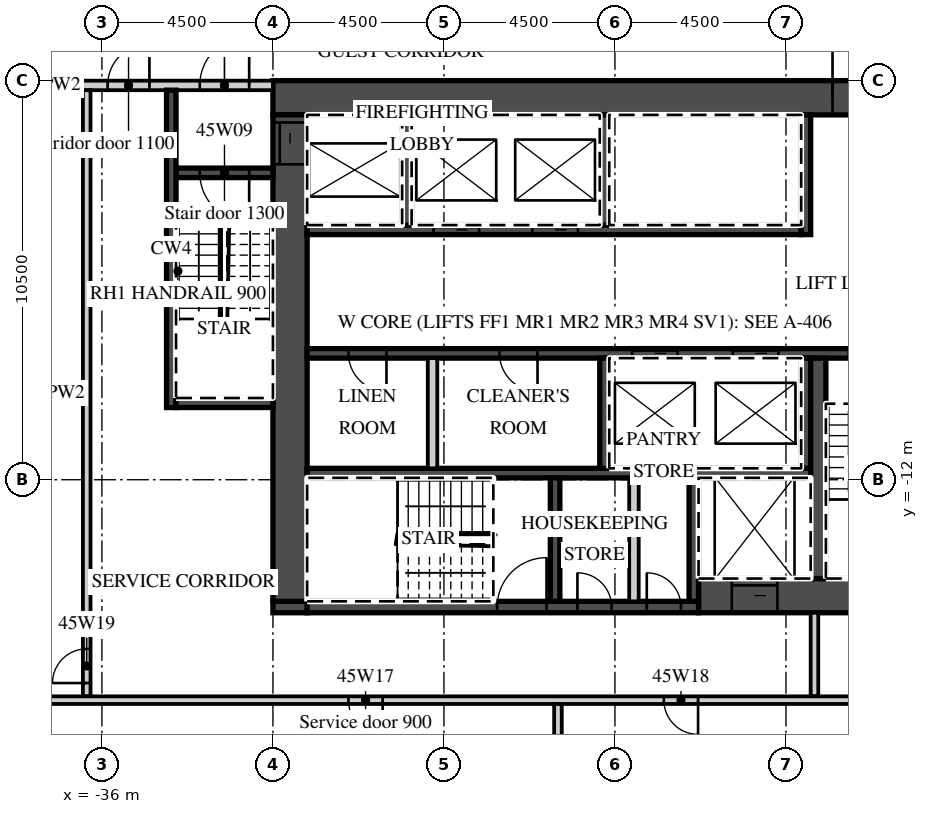
"""IFC4 building model, lengths in metres.
Left out: names, types, materials, properties, quantities, classifications, styles, units other than length and angle.
Written with IfcOpenShell. Run it as: python <this file> out.ifc"""

import sys

from ifc_helpers import new_model, si_unit, direction, frame, frame_2d, origin, place, context, subcontext, project, spatial, rectangle, extrude, element, fill, save


model = new_model("IFC4")
c1 = context("Model", 3, precision=1e-05, world=origin(), true_north=direction((0.0, 1.0)))
c2 = subcontext(c1, "Body", "Model", "MODEL_VIEW")
j1 = project(units=[si_unit("LENGTHUNIT", "METRE"), si_unit("PLANEANGLEUNIT", "RADIAN")], contexts=[c1])
p1 = place(None, origin())
s1 = spatial("IfcSite", under=j1, at=p1, CompositionType="ELEMENT")
p2 = place(p1, origin())
s2 = spatial("IfcBuilding", under=s1, at=p2, CompositionType="ELEMENT")
p3 = place(p2, frame((0.0, 0.0, 190.0)))
s3 = spatial("IfcBuildingStorey", under=s2, at=p3, CompositionType="ELEMENT", Elevation=190.0)
p4 = place(p3, frame((-31.5, -1.95, 0.0), z_axis=(0.0, 0.0, 1.0), x_axis=(1.0, 0.0, 0.0)))
e1 = element("IfcWall", 1, at=p4, inside=s3, PredefinedType="SHEAR", context=c2, shape_type="SweptSolid", body=[
    extrude(rectangle(XDim=18.0, YDim=0.9, at=frame_2d((9.0, 0.0))), origin(), (0.0, 0.0, 1.0), 3.02),
])
p5 = place(p4, frame((14.725, 0.0, 0.0)))
e2 = element("IfcOpeningElement", 2, at=p5, cuts=e1, PredefinedType="OPENING", context=c2, shape_type="SweptSolid", body=[
    extrude(rectangle(XDim=1.8, YDim=2.1, at=frame_2d((0.9, 1.05))), frame((0.0, 0.46, 0.0), z_axis=(0.0, -1.0, 0.0), x_axis=(1.0, 0.0, 0.0)), (0.0, 0.0, 1.0), 0.92),
])
p6 = place(p3, frame((-20.3, -15.05, 0.0), z_axis=(0.0, 0.0, 1.0), x_axis=(1.0, 0.0, 0.0)))
e3 = element("IfcWall", 3, at=p6, inside=s3, PredefinedType="SHEAR", context=c2, shape_type="SweptSolid", body=[
    extrude(rectangle(XDim=6.8, YDim=0.9, at=frame_2d((3.4, 0.0))), origin(), (0.0, 0.0, 1.0), 3.02),
])
p7 = place(p6, frame((0.875, 0.0, 0.0)))
e4 = element("IfcOpeningElement", 4, at=p7, cuts=e3, PredefinedType="OPENING", context=c2, shape_type="SweptSolid", body=[
    extrude(rectangle(XDim=1.2, YDim=2.1, at=frame_2d((0.6, 1.05))), frame((0.0, 0.46, 0.0), z_axis=(0.0, -1.0, 0.0), x_axis=(1.0, 0.0, 0.0)), (0.0, 0.0, 1.0), 0.92),
])
p8 = place(p3, frame((-31.5, -15.35, 0.0), z_axis=(0.0, 0.0, 1.0), x_axis=(1.0, 0.0, 0.0)))
e5 = element("IfcWall", 5, at=p8, inside=s3, PredefinedType="SHEAR", context=c2, shape_type="SweptSolid", body=[
    extrude(rectangle(XDim=0.9, YDim=0.3, at=frame_2d((0.45, 0.0))), origin(), (0.0, 0.0, 1.0), 3.02),
])
p9 = place(p3, frame((-30.6, -15.35, 0.0), z_axis=(0.0, 0.0, 1.0), x_axis=(1.0, 0.0, 0.0)))
e6 = element("IfcWall", 6, at=p9, inside=s3, PredefinedType="SHEAR", context=c2, shape_type="SweptSolid", body=[
    extrude(rectangle(XDim=10.3, YDim=0.3, at=frame_2d((5.15, 0.0))), origin(), (0.0, 0.0, 1.0), 3.02),
])
p10 = place(p9, frame((5.0, 0.0, 0.0)))
e7 = element("IfcOpeningElement", 7, at=p10, cuts=e6, PredefinedType="OPENING", context=c2, shape_type="SweptSolid", body=[
    extrude(rectangle(XDim=1.3, YDim=2.1, at=frame_2d((0.65, 1.05))), frame((0.0, 0.16, 0.0), z_axis=(0.0, -1.0, 0.0), x_axis=(1.0, 0.0, 0.0)), (0.0, 0.0, 1.0), 0.32),
])
p11 = place(p9, frame((7.113, 0.0, 0.0)))
e8 = element("IfcOpeningElement", 8, at=p11, cuts=e6, PredefinedType="OPENING", context=c2, shape_type="SweptSolid", body=[
    extrude(rectangle(XDim=0.9, YDim=2.1, at=frame_2d((0.45, 1.05))), frame((0.0, 0.16, 0.0), z_axis=(0.0, -1.0, 0.0), x_axis=(1.0, 0.0, 0.0)), (0.0, 0.0, 1.0), 0.32),
])
p12 = place(p9, frame((8.938, 0.0, 0.0)))
e9 = element("IfcOpeningElement", 9, at=p12, cuts=e6, PredefinedType="OPENING", context=c2, shape_type="SweptSolid", body=[
    extrude(rectangle(XDim=0.9, YDim=2.1, at=frame_2d((0.45, 1.05))), frame((0.0, 0.16, 0.0), z_axis=(0.0, -1.0, 0.0), x_axis=(1.0, 0.0, 0.0)), (0.0, 0.0, 1.0), 0.32),
])
p13 = place(p3, frame((-31.05, -15.2, 0.0), z_axis=(0.0, 0.0, 1.0), x_axis=(0.0, 1.0, 0.0)))
e10 = element("IfcWall", 10, at=p13, inside=s3, PredefinedType="SHEAR", context=c2, shape_type="SweptSolid", body=[
    extrude(rectangle(XDim=12.8, YDim=0.9, at=frame_2d((6.4, 0.0))), origin(), (0.0, 0.0, 1.0), 3.02),
])
p14 = place(p13, frame((11.5, 0.0, 0.0)))
e11 = element("IfcOpeningElement", 11, at=p14, cuts=e10, PredefinedType="OPENING", context=c2, shape_type="SweptSolid", body=[
    extrude(rectangle(XDim=1.1, YDim=2.1, at=frame_2d((0.55, 1.05))), frame((0.0, 0.46, 0.0), z_axis=(0.0, -1.0, 0.0), x_axis=(1.0, 0.0, 0.0)), (0.0, 0.0, 1.0), 0.92),
])
p15 = place(p3, frame((-30.6, -5.425, 0.0), z_axis=(0.0, 0.0, 1.0), x_axis=(1.0, 0.0, 0.0)))
e12 = element("IfcWall", 12, at=p15, inside=s3, PredefinedType="SHEAR", context=c2, shape_type="SweptSolid", body=[
    extrude(rectangle(XDim=13.0, YDim=0.25, at=frame_2d((6.5, 0.0))), origin(), (0.0, 0.0, 1.0), 3.02),
])
p16 = place(p15, frame((3.325, 0.0, 0.0)))
e13 = element("IfcOpeningElement", 13, at=p16, cuts=e12, PredefinedType="OPENING", context=c2, shape_type="SweptSolid", body=[
    extrude(rectangle(XDim=1.2, YDim=2.1, at=frame_2d((0.6, 1.05))), frame((0.0, 0.135, 0.0), z_axis=(0.0, -1.0, 0.0), x_axis=(1.0, 0.0, 0.0)), (0.0, 0.0, 1.0), 0.27),
])
p17 = place(p15, frame((5.925, 0.0, 0.0)))
e14 = element("IfcOpeningElement", 14, at=p17, cuts=e12, PredefinedType="OPENING", context=c2, shape_type="SweptSolid", body=[
    extrude(rectangle(XDim=1.2, YDim=2.1, at=frame_2d((0.6, 1.05))), frame((0.0, 0.135, 0.0), z_axis=(0.0, -1.0, 0.0), x_axis=(1.0, 0.0, 0.0)), (0.0, 0.0, 1.0), 0.27),
])
p18 = place(p3, frame((-17.475, -5.55, 0.0), z_axis=(0.0, 0.0, 1.0), x_axis=(0.0, 1.0, 0.0)))
e15 = element("IfcWall", 15, at=p18, inside=s3, PredefinedType="SHEAR", context=c2, shape_type="SweptSolid", body=[
    extrude(rectangle(XDim=3.15, YDim=0.25, at=frame_2d((1.575, 0.0))), origin(), (0.0, 0.0, 1.0), 3.02),
])
for number, where, z_axis, x_axis in (
    (16, (-27.975, -5.3, 0.0), (0.0, 0.0, 1.0), (0.0, 1.0, 0.0)),
    (17, (-22.775, -5.3, 0.0), (0.0, 0.0, 1.0), (0.0, 1.0, 0.0)),
):
    element("IfcWall", number, at=place(p3, frame(where, z_axis=z_axis, x_axis=x_axis)), inside=s3, PredefinedType="SHEAR", context=c2, shape_type="SweptSolid", body=[
        extrude(rectangle(XDim=2.9, YDim=0.25, at=frame_2d((1.45, 0.0))), origin(), (0.0, 0.0, 1.0), 3.02),
    ])
p19 = place(p3, frame((-30.6, -8.675, 0.0), z_axis=(0.0, 0.0, 1.0), x_axis=(1.0, 0.0, 0.0)))
e18 = element("IfcWall", 18, at=p19, inside=s3, PredefinedType="SHEAR", context=c2, shape_type="SweptSolid", body=[
    extrude(rectangle(XDim=16.2, YDim=0.25, at=frame_2d((8.1, 0.0))), origin(), (0.0, 0.0, 1.0), 3.02),
])
p20 = place(p19, frame((8.55, 0.0, 0.0)))
e19 = element("IfcOpeningElement", 19, at=p20, cuts=e18, PredefinedType="OPENING", context=c2, shape_type="SweptSolid", body=[
    extrude(rectangle(XDim=1.2, YDim=2.1, at=frame_2d((0.6, 1.05))), frame((0.0, 0.135, 0.0), z_axis=(0.0, -1.0, 0.0), x_axis=(1.0, 0.0, 0.0)), (0.0, 0.0, 1.0), 0.27),
])
p21 = place(p19, frame((11.2, 0.0, 0.0)))
e20 = element("IfcOpeningElement", 20, at=p21, cuts=e18, PredefinedType="OPENING", context=c2, shape_type="SweptSolid", body=[
    extrude(rectangle(XDim=1.2, YDim=2.1, at=frame_2d((0.6, 1.05))), frame((0.0, 0.135, 0.0), z_axis=(0.0, -1.0, 0.0), x_axis=(1.0, 0.0, 0.0)), (0.0, 0.0, 1.0), 0.27),
])
p22 = place(p19, frame((14.25, 0.0, 0.0)))
e21 = element("IfcOpeningElement", 21, at=p22, cuts=e18, PredefinedType="OPENING", context=c2, shape_type="SweptSolid", body=[
    extrude(rectangle(XDim=1.3, YDim=2.1, at=frame_2d((0.65, 1.05))), frame((0.0, 0.135, 0.0), z_axis=(0.0, -1.0, 0.0), x_axis=(1.0, 0.0, 0.0)), (0.0, 0.0, 1.0), 0.27),
])
p23 = place(p19, frame((1.087, 0.0, 0.0)))
e22 = element("IfcOpeningElement", 22, at=p23, cuts=e18, PredefinedType="OPENING", context=c2, shape_type="SweptSolid", body=[
    extrude(rectangle(XDim=1.0, YDim=2.1, at=frame_2d((0.5, 1.05))), frame((0.0, 0.135, 0.0), z_axis=(0.0, -1.0, 0.0), x_axis=(1.0, 0.0, 0.0)), (0.0, 0.0, 1.0), 0.27),
])
p24 = place(p19, frame((5.062, 0.0, 0.0)))
e23 = element("IfcOpeningElement", 23, at=p24, cuts=e18, PredefinedType="OPENING", context=c2, shape_type="SweptSolid", body=[
    extrude(rectangle(XDim=1.0, YDim=2.1, at=frame_2d((0.5, 1.05))), frame((0.0, 0.135, 0.0), z_axis=(0.0, -1.0, 0.0), x_axis=(1.0, 0.0, 0.0)), (0.0, 0.0, 1.0), 0.27),
])
p25 = place(p3, frame((-30.6, -11.825, 0.0), z_axis=(0.0, 0.0, 1.0), x_axis=(1.0, 0.0, 0.0)))
e24 = element("IfcWall", 24, at=p25, inside=s3, PredefinedType="SHEAR", context=c2, shape_type="SweptSolid", body=[
    extrude(rectangle(XDim=13.25, YDim=0.25, at=frame_2d((6.625, 0.0))), origin(), (0.0, 0.0, 1.0), 3.02),
])
for number, where, z_axis, x_axis in (
    (25, (-17.475, -11.7, 0.0), (0.0, 0.0, 1.0), (0.0, 1.0, 0.0)),
    (26, (-22.775, -11.7, 0.0), (0.0, 0.0, 1.0), (0.0, 1.0, 0.0)),
):
    element("IfcWall", number, at=place(p3, frame(where, z_axis=z_axis, x_axis=x_axis)), inside=s3, PredefinedType="SHEAR", context=c2, shape_type="SweptSolid", body=[
        extrude(rectangle(XDim=2.9, YDim=0.25, at=frame_2d((1.45, 0.0))), origin(), (0.0, 0.0, 1.0), 3.02),
    ])
p26 = place(p3, frame((-27.3, -11.7, 0.0), z_axis=(0.0, 0.0, 1.0), x_axis=(0.0, 1.0, 0.0)))
e27 = element("IfcWall", 27, at=p26, inside=s3, PredefinedType="PARTITIONING", context=c2, shape_type="SweptSolid", body=[
    extrude(rectangle(XDim=2.9, YDim=0.25, at=frame_2d((1.45, 0.0))), origin(), (0.0, 0.0, 1.0), 3.02),
])
p27 = place(p3, frame((-17.15, -14.6, 0.0), z_axis=(0.0, 0.0, 1.0), x_axis=(0.0, 1.0, 0.0)))
e28 = element("IfcWall", 28, at=p27, inside=s3, PredefinedType="SHEAR", context=c2, shape_type="SweptSolid", body=[
    extrude(rectangle(XDim=5.8, YDim=0.4, at=frame_2d((2.9, 0.0))), origin(), (0.0, 0.0, 1.0), 3.02),
])
for number, where, z_axis, x_axis in (
    (29, (-20.425, -15.2, 0.0), (0.0, 0.0, 1.0), (0.0, 1.0, 0.0)),
    (30, (-24.075, -15.2, 0.0), (0.0, 0.0, 1.0), (0.0, 1.0, 0.0)),
):
    element("IfcWall", number, at=place(p3, frame(where, z_axis=z_axis, x_axis=x_axis)), inside=s3, PredefinedType="SHEAR", context=c2, shape_type="SweptSolid", body=[
        extrude(rectangle(XDim=3.25, YDim=0.25, at=frame_2d((1.625, 0.0))), origin(), (0.0, 0.0, 1.0), 3.02),
    ])
p28 = place(p3, frame((-22.0, -15.2, 0.0), z_axis=(0.0, 0.0, 1.0), x_axis=(0.0, 1.0, 0.0)))
e31 = element("IfcWall", 31, at=p28, inside=s3, PredefinedType="PARTITIONING", context=c2, shape_type="SweptSolid", body=[
    extrude(rectangle(XDim=3.25, YDim=0.25, at=frame_2d((1.625, 0.0))), origin(), (0.0, 0.0, 1.0), 3.02),
])
p29 = place(p3, frame((-42.632, -1.625, 0.0), z_axis=(0.0, 0.0, 1.0), x_axis=(1.0, 0.0, 0.0)))
e32 = element("IfcWall", 32, at=p29, inside=s3, PredefinedType="PARTITIONING", context=c2, shape_type="SweptSolid", body=[
    extrude(rectangle(XDim=11.132, YDim=0.25, at=frame_2d((5.566, 0.0))), origin(), (0.0, 0.0, 1.0), 3.02),
])
p30 = place(p29, frame((9.207, 0.0, 0.0)))
e33 = element("IfcOpeningElement", 33, at=p30, cuts=e32, PredefinedType="OPENING", context=c2, shape_type="SweptSolid", body=[
    extrude(rectangle(XDim=1.3, YDim=2.1, at=frame_2d((0.65, 1.05))), frame((0.0, 0.135, 0.0), z_axis=(0.0, -1.0, 0.0), x_axis=(1.0, 0.0, 0.0)), (0.0, 0.0, 1.0), 0.27),
])
p31 = place(p29, frame((6.781, 0.0, 0.0)))
e34 = element("IfcOpeningElement", 34, at=p31, cuts=e32, PredefinedType="OPENING", context=c2, shape_type="SweptSolid", body=[
    extrude(rectangle(XDim=1.1, YDim=2.1, at=frame_2d((0.55, 1.05))), frame((0.0, 0.135, 0.0), z_axis=(0.0, -1.0, 0.0), x_axis=(1.0, 0.0, 0.0)), (0.0, 0.0, 1.0), 0.27),
])
p32 = place(p3, frame((-34.05, -3.925, 0.0), z_axis=(0.0, 0.0, 1.0), x_axis=(1.0, 0.0, 0.0)))
e35 = element("IfcWall", 35, at=p32, inside=s3, PredefinedType="SHEAR", context=c2, shape_type="SweptSolid", body=[
    extrude(rectangle(XDim=2.55, YDim=0.25, at=frame_2d((1.275, 0.0))), origin(), (0.0, 0.0, 1.0), 3.02),
])
p33 = place(p32, frame((0.625, 0.0, 0.0)))
e36 = element("IfcOpeningElement", 36, at=p33, cuts=e35, PredefinedType="OPENING", context=c2, shape_type="SweptSolid", body=[
    extrude(rectangle(XDim=1.3, YDim=2.1, at=frame_2d((0.65, 1.05))), frame((0.0, 0.135, 0.0), z_axis=(0.0, -1.0, 0.0), x_axis=(1.0, 0.0, 0.0)), (0.0, 0.0, 1.0), 0.27),
])
p34 = place(p3, frame((-34.175, -10.1, 0.0), z_axis=(0.0, 0.0, 1.0), x_axis=(0.0, 1.0, 0.0)))
e37 = element("IfcWall", 37, at=p34, inside=s3, PredefinedType="SHEAR", context=c2, shape_type="SweptSolid", body=[
    extrude(rectangle(XDim=8.35, YDim=0.25, at=frame_2d((4.175, 0.0))), origin(), (0.0, 0.0, 1.0), 3.02),
])
p35 = place(p3, frame((-34.05, -9.975, 0.0), z_axis=(0.0, 0.0, 1.0), x_axis=(1.0, 0.0, 0.0)))
e38 = element("IfcWall", 38, at=p35, inside=s3, PredefinedType="SHEAR", context=c2, shape_type="SweptSolid", body=[
    extrude(rectangle(XDim=2.55, YDim=0.25, at=frame_2d((1.275, 0.0))), origin(), (0.0, 0.0, 1.0), 3.02),
])
p36 = place(p3, frame((-17.25, -17.7, 0.0), z_axis=(0.0, 0.0, 1.0), x_axis=(0.0, 1.0, 0.0)))
e39 = element("IfcWall", 39, at=p36, inside=s3, PredefinedType="PARTITIONING", context=c2, shape_type="SweptSolid", body=[
    extrude(rectangle(XDim=2.2, YDim=0.2, at=frame_2d((1.1, 0.0))), origin(), (0.0, 0.0, 1.0), 3.02),
])
p37 = place(p3, frame((-36.4, -17.7, 0.0), z_axis=(0.0, 0.0, 1.0), x_axis=(0.0, 1.0, 0.0)))
e40 = element("IfcWall", 40, at=p37, inside=s3, PredefinedType="PARTITIONING", context=c2, shape_type="SweptSolid", body=[
    extrude(rectangle(XDim=15.95, YDim=0.2, at=frame_2d((7.975, 0.0))), origin(), (0.0, 0.0, 1.0), 3.02),
])
p38 = place(p37, frame((0.35, 0.0, 0.0)))
e41 = element("IfcOpeningElement", 41, at=p38, cuts=e40, PredefinedType="OPENING", context=c2, shape_type="SweptSolid", body=[
    extrude(rectangle(XDim=0.9, YDim=2.1, at=frame_2d((0.45, 1.05))), frame((0.0, 0.11, 0.0), z_axis=(0.0, -1.0, 0.0), x_axis=(1.0, 0.0, 0.0)), (0.0, 0.0, 1.0), 0.22),
])
p39 = place(p3, frame((-41.074, -17.8, 0.0), z_axis=(0.0, 0.0, 1.0), x_axis=(1.0, 0.0, 0.0)))
e42 = element("IfcWall", 42, at=p39, inside=s3, PredefinedType="PARTITIONING", context=c2, shape_type="SweptSolid", body=[
    extrude(rectangle(XDim=27.474, YDim=0.2, at=frame_2d((13.737, 0.0))), origin(), (0.0, 0.0, 1.0), 3.02),
])
p40 = place(p39, frame((11.562, 0.0, 0.0)))
e43 = element("IfcOpeningElement", 43, at=p40, cuts=e42, PredefinedType="OPENING", context=c2, shape_type="SweptSolid", body=[
    extrude(rectangle(XDim=0.9, YDim=2.1, at=frame_2d((0.45, 1.05))), frame((0.0, 0.11, 0.0), z_axis=(0.0, -1.0, 0.0), x_axis=(1.0, 0.0, 0.0)), (0.0, 0.0, 1.0), 0.22),
])
p41 = place(p39, frame((19.862, 0.0, 0.0)))
e44 = element("IfcOpeningElement", 44, at=p41, cuts=e42, PredefinedType="OPENING", context=c2, shape_type="SweptSolid", body=[
    extrude(rectangle(XDim=0.9, YDim=2.1, at=frame_2d((0.45, 1.05))), frame((0.0, 0.11, 0.0), z_axis=(0.0, -1.0, 0.0), x_axis=(1.0, 0.0, 0.0)), (0.0, 0.0, 1.0), 0.22),
])
p42 = place(p3, frame((-24.0, -23.312, 0.0), z_axis=(0.0, 0.0, 1.0), x_axis=(0.0, 1.0, 0.0)))
e45 = element("IfcWall", 45, at=p42, inside=s3, PredefinedType="PARTITIONING", context=c2, shape_type="SweptSolid", body=[
    extrude(rectangle(XDim=5.413, YDim=0.2, at=frame_2d((2.706, 0.0))), origin(), (0.0, 0.0, 1.0), 3.02),
])
p43 = place(p20, origin())
e46 = element("IfcDoor", 46, at=p43, inside=s3, OperationType="SLIDING_TO_LEFT", PredefinedType="DOOR", context=c2, shape_type="SweptSolid", body=[
    extrude(rectangle(XDim=1.2, YDim=2.1, at=frame_2d((0.6, 1.05))), frame((0.0, 0.025, 0.0), z_axis=(0.0, -1.0, 0.0), x_axis=(1.0, 0.0, 0.0)), (0.0, 0.0, 1.0), 0.05),
])
fill(e19, e46)
p44 = place(p21, origin())
e47 = element("IfcDoor", 47, at=p44, inside=s3, OperationType="SLIDING_TO_RIGHT", PredefinedType="DOOR", context=c2, shape_type="SweptSolid", body=[
    extrude(rectangle(XDim=1.2, YDim=2.1, at=frame_2d((0.6, 1.05))), frame((0.0, 0.025, 0.0), z_axis=(0.0, -1.0, 0.0), x_axis=(1.0, 0.0, 0.0)), (0.0, 0.0, 1.0), 0.05),
])
fill(e20, e47)
p45 = place(p16, origin())
e48 = element("IfcDoor", 48, at=p45, inside=s3, OperationType="SLIDING_TO_RIGHT", PredefinedType="DOOR", context=c2, shape_type="SweptSolid", body=[
    extrude(rectangle(XDim=1.2, YDim=2.1, at=frame_2d((0.6, 1.05))), frame((0.0, 0.025, 0.0), z_axis=(0.0, -1.0, 0.0), x_axis=(1.0, 0.0, 0.0)), (0.0, 0.0, 1.0), 0.05),
])
fill(e13, e48)
p46 = place(p17, origin())
e49 = element("IfcDoor", 49, at=p46, inside=s3, OperationType="SLIDING_TO_RIGHT", PredefinedType="DOOR", context=c2, shape_type="SweptSolid", body=[
    extrude(rectangle(XDim=1.2, YDim=2.1, at=frame_2d((0.6, 1.05))), frame((0.0, 0.025, 0.0), z_axis=(0.0, -1.0, 0.0), x_axis=(1.0, 0.0, 0.0)), (0.0, 0.0, 1.0), 0.05),
])
fill(e14, e49)
p47 = place(p7, origin())
e50 = element("IfcDoor", 50, at=p47, inside=s3, OperationType="SLIDING_TO_LEFT", PredefinedType="DOOR", context=c2, shape_type="SweptSolid", body=[
    extrude(rectangle(XDim=1.2, YDim=2.1, at=frame_2d((0.6, 1.05))), frame((0.0, 0.025, 0.0), z_axis=(0.0, -1.0, 0.0), x_axis=(1.0, 0.0, 0.0)), (0.0, 0.0, 1.0), 0.05),
])
fill(e4, e50)
p48 = place(p14, origin())
e51 = element("IfcDoor", 51, at=p48, inside=s3, OperationType="SLIDING_TO_RIGHT", PredefinedType="DOOR", context=c2, shape_type="SweptSolid", body=[
    extrude(rectangle(XDim=1.1, YDim=2.1, at=frame_2d((0.55, 1.05))), frame((0.0, 0.025, 0.0), z_axis=(0.0, -1.0, 0.0), x_axis=(1.0, 0.0, 0.0)), (0.0, 0.0, 1.0), 0.05),
])
fill(e11, e51)
p49 = place(p5, origin())
e52 = element("IfcDoor", 52, at=p49, inside=s3, OperationType="DOUBLE_DOOR_DOUBLE_SWING", PredefinedType="DOOR", context=c2, shape_type="SweptSolid", body=[
    extrude(rectangle(XDim=1.8, YDim=2.1, at=frame_2d((0.9, 1.05))), frame((0.0, 0.025, 0.0), z_axis=(0.0, -1.0, 0.0), x_axis=(1.0, 0.0, 0.0)), (0.0, 0.0, 1.0), 0.05),
])
fill(e2, e52)
p50 = place(p30, origin())
e53 = element("IfcDoor", 53, at=p50, inside=s3, OperationType="SINGLE_SWING_RIGHT", PredefinedType="DOOR", context=c2, shape_type="SweptSolid", body=[
    extrude(rectangle(XDim=1.3, YDim=2.1, at=frame_2d((0.65, 1.05))), frame((0.0, 0.025, 0.0), z_axis=(0.0, -1.0, 0.0), x_axis=(1.0, 0.0, 0.0)), (0.0, 0.0, 1.0), 0.05),
])
fill(e33, e53)
p51 = place(p33, origin())
e54 = element("IfcDoor", 54, at=p51, inside=s3, OperationType="SINGLE_SWING_RIGHT", PredefinedType="DOOR", context=c2, shape_type="SweptSolid", body=[
    extrude(rectangle(XDim=1.3, YDim=2.1, at=frame_2d((0.65, 1.05))), frame((0.0, 0.025, 0.0), z_axis=(0.0, -1.0, 0.0), x_axis=(1.0, 0.0, 0.0)), (0.0, 0.0, 1.0), 0.05),
])
fill(e36, e54)
p52 = place(p31, origin())
e55 = element("IfcDoor", 55, at=p52, inside=s3, OperationType="SINGLE_SWING_RIGHT", PredefinedType="DOOR", context=c2, shape_type="SweptSolid", body=[
    extrude(rectangle(XDim=1.1, YDim=2.1, at=frame_2d((0.55, 1.05))), frame((0.0, 0.025, 0.0), z_axis=(0.0, -1.0, 0.0), x_axis=(1.0, 0.0, 0.0)), (0.0, 0.0, 1.0), 0.05),
])
fill(e34, e55)
p53 = place(p22, origin())
e56 = element("IfcDoor", 56, at=p53, inside=s3, OperationType="SINGLE_SWING_RIGHT", PredefinedType="DOOR", context=c2, shape_type="SweptSolid", body=[
    extrude(rectangle(XDim=1.3, YDim=2.1, at=frame_2d((0.65, 1.05))), frame((0.0, 0.025, 0.0), z_axis=(0.0, -1.0, 0.0), x_axis=(1.0, 0.0, 0.0)), (0.0, 0.0, 1.0), 0.05),
])
fill(e21, e56)
p54 = place(p10, origin())
e57 = element("IfcDoor", 57, at=p54, inside=s3, OperationType="SINGLE_SWING_RIGHT", PredefinedType="DOOR", context=c2, shape_type="SweptSolid", body=[
    extrude(rectangle(XDim=1.3, YDim=2.1, at=frame_2d((0.65, 1.05))), frame((0.0, 0.025, 0.0), z_axis=(0.0, -1.0, 0.0), x_axis=(1.0, 0.0, 0.0)), (0.0, 0.0, 1.0), 0.05),
])
fill(e7, e57)
p55 = place(p11, origin())
e58 = element("IfcDoor", 58, at=p55, inside=s3, OperationType="SINGLE_SWING_LEFT", PredefinedType="DOOR", context=c2, shape_type="SweptSolid", body=[
    extrude(rectangle(XDim=0.9, YDim=2.1, at=frame_2d((0.45, 1.05))), frame((0.0, 0.025, 0.0), z_axis=(0.0, -1.0, 0.0), x_axis=(1.0, 0.0, 0.0)), (0.0, 0.0, 1.0), 0.05),
])
fill(e8, e58)
p56 = place(p12, origin())
e59 = element("IfcDoor", 59, at=p56, inside=s3, OperationType="SINGLE_SWING_LEFT", PredefinedType="DOOR", context=c2, shape_type="SweptSolid", body=[
    extrude(rectangle(XDim=0.9, YDim=2.1, at=frame_2d((0.45, 1.05))), frame((0.0, 0.025, 0.0), z_axis=(0.0, -1.0, 0.0), x_axis=(1.0, 0.0, 0.0)), (0.0, 0.0, 1.0), 0.05),
])
fill(e9, e59)
p57 = place(p23, origin())
e60 = element("IfcDoor", 60, at=p57, inside=s3, OperationType="SINGLE_SWING_RIGHT", PredefinedType="DOOR", context=c2, shape_type="SweptSolid", body=[
    extrude(rectangle(XDim=1.0, YDim=2.1, at=frame_2d((0.5, 1.05))), frame((0.0, 0.025, 0.0), z_axis=(0.0, -1.0, 0.0), x_axis=(1.0, 0.0, 0.0)), (0.0, 0.0, 1.0), 0.05),
])
fill(e22, e60)
p58 = place(p24, origin())
e61 = element("IfcDoor", 61, at=p58, inside=s3, OperationType="SINGLE_SWING_RIGHT", PredefinedType="DOOR", context=c2, shape_type="SweptSolid", body=[
    extrude(rectangle(XDim=1.0, YDim=2.1, at=frame_2d((0.5, 1.05))), frame((0.0, 0.025, 0.0), z_axis=(0.0, -1.0, 0.0), x_axis=(1.0, 0.0, 0.0)), (0.0, 0.0, 1.0), 0.05),
])
fill(e23, e61)
p59 = place(p40, origin())
e62 = element("IfcDoor", 62, at=p59, inside=s3, OperationType="SINGLE_SWING_RIGHT", PredefinedType="DOOR", context=c2, shape_type="SweptSolid", body=[
    extrude(rectangle(XDim=0.9, YDim=2.1, at=frame_2d((0.45, 1.05))), frame((0.0, 0.025, 0.0), z_axis=(0.0, -1.0, 0.0), x_axis=(1.0, 0.0, 0.0)), (0.0, 0.0, 1.0), 0.05),
])
fill(e43, e62)
p60 = place(p41, origin())
e63 = element("IfcDoor", 63, at=p60, inside=s3, OperationType="SINGLE_SWING_RIGHT", PredefinedType="DOOR", context=c2, shape_type="SweptSolid", body=[
    extrude(rectangle(XDim=0.9, YDim=2.1, at=frame_2d((0.45, 1.05))), frame((0.0, 0.025, 0.0), z_axis=(0.0, -1.0, 0.0), x_axis=(1.0, 0.0, 0.0)), (0.0, 0.0, 1.0), 0.05),
])
fill(e44, e63)
p61 = place(p38, origin())
e64 = element("IfcDoor", 64, at=p61, inside=s3, OperationType="SINGLE_SWING_LEFT", PredefinedType="DOOR", context=c2, shape_type="SweptSolid", body=[
    extrude(rectangle(XDim=0.9, YDim=2.1, at=frame_2d((0.45, 1.05))), frame((0.0, 0.025, 0.0), z_axis=(0.0, -1.0, 0.0), x_axis=(1.0, 0.0, 0.0)), (0.0, 0.0, 1.0), 0.05),
])
fill(e41, e64)
save(model, sys.argv[1])
